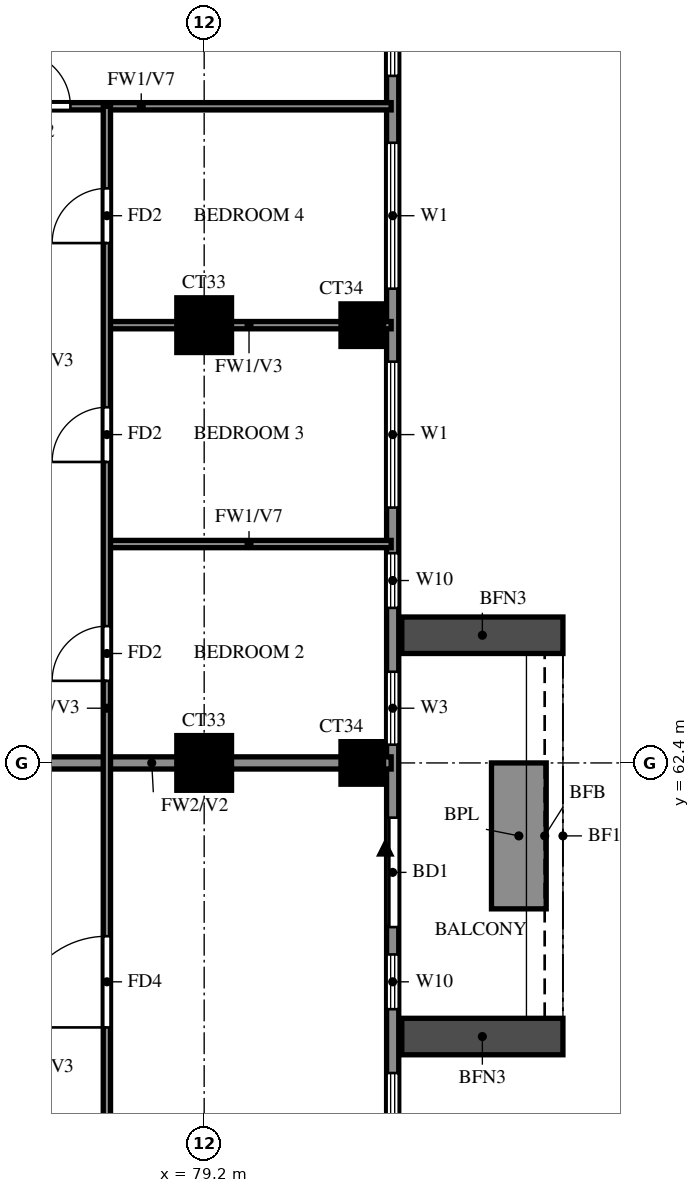
"""IFC4 building model, lengths in metres.
Left out: names, types, materials, properties, quantities, classifications, styles, units other than length and angle.
Written with IfcOpenShell. Run it as: python <this file> out.ifc"""

import sys

from ifc_helpers import new_model, si_unit, direction, frame, frame_2d, origin, origin_2d, place, context, subcontext, project, spatial, rectangle, extrude, source, transform, mapped, element, fill, save


model = new_model("IFC4")
c1 = context("Model", 3, precision=1e-05, world=origin(), true_north=direction((0.0, 1.0)))
c2 = subcontext(c1, "Body", "Model", "MODEL_VIEW")
j1 = project(units=[si_unit("LENGTHUNIT", "METRE"), si_unit("PLANEANGLEUNIT", "RADIAN")], contexts=[c1])
p1 = place(None, origin())
s1 = spatial("IfcSite", under=j1, at=p1, CompositionType="ELEMENT")
p2 = place(p1, origin())
s2 = spatial("IfcBuilding", under=s1, at=p2, CompositionType="ELEMENT")
p3 = place(p2, frame((0.0, 0.0, 222.0)))
s3 = spatial("IfcBuildingStorey", under=s2, at=p3, CompositionType="ELEMENT", Elevation=222.0)
m1 = source(origin(), c2, "Body", "SweptSolid", [
    extrude(rectangle(XDim=0.9, YDim=0.9, at=origin_2d()), origin(), (0.0, 0.0, 1.0), 3.22),
])
p4 = place(p3, frame((79.2, 62.4, 0.0), z_axis=(0.0, 0.0, 1.0), x_axis=(1.0, 0.0, 0.0)))
e1 = element("IfcColumn", 1, at=p4, inside=s3, PredefinedType="COLUMN", context=c2, shape_type="MappedRepresentation", body=[
    mapped(m1, transform((0.0, 0.0, 0.0))),
])
m2 = source(origin(), c2, "Body", "SweptSolid", [
    extrude(rectangle(XDim=0.7, YDim=0.7, at=origin_2d()), origin(), (0.0, 0.0, 1.0), 3.22),
])
p5 = place(p3, frame((81.8, 62.4, 0.0), z_axis=(0.0, 0.0, 1.0), x_axis=(1.0, 0.0, 0.0)))
e2 = element("IfcColumn", 2, at=p5, inside=s3, PredefinedType="COLUMN", context=c2, shape_type="MappedRepresentation", body=[
    mapped(m2, transform((0.0, 0.0, 0.0))),
])
p6 = place(p3, frame((79.2, 69.6, 0.0), z_axis=(0.0, 0.0, 1.0), x_axis=(1.0, 0.0, 0.0)))
e3 = element("IfcColumn", 3, at=p6, inside=s3, PredefinedType="COLUMN", context=c2, shape_type="MappedRepresentation", body=[
    mapped(m1, transform((0.0, 0.0, 0.0))),
])
p7 = place(p3, frame((81.8, 69.6, 0.0), z_axis=(0.0, 0.0, 1.0), x_axis=(1.0, 0.0, 0.0)))
e4 = element("IfcColumn", 4, at=p7, inside=s3, PredefinedType="COLUMN", context=c2, shape_type="MappedRepresentation", body=[
    mapped(m2, transform((0.0, 0.0, 0.0))),
])
p8 = place(p3, frame((82.3, 48.2, 0.0), z_axis=(0.0, 0.0, 1.0), x_axis=(0.0, 1.0, 0.0)))
e5 = element("IfcWall", 5, at=p8, inside=s3, PredefinedType="SOLIDWALL", context=c2, shape_type="SweptSolid", body=[
    extrude(rectangle(XDim=28.6, YDim=0.2, at=frame_2d((14.3, 0.0))), origin(), (0.0, 0.0, 1.0), 3.22),
])
p9 = place(p8, frame((11.5, 0.0, 0.0)))
e6 = element("IfcOpeningElement", 6, at=p9, cuts=e5, PredefinedType="OPENING", context=c2, shape_type="SweptSolid", body=[
    extrude(rectangle(XDim=1.8, YDim=2.4, at=frame_2d((0.9, 1.2))), frame((0.0, 0.11, 0.0), z_axis=(0.0, -1.0, 0.0), x_axis=(1.0, 0.0, 0.0)), (0.0, 0.0, 1.0), 0.22),
])
p10 = place(p8, frame((0.6, 0.0, 0.6)))
e7 = element("IfcOpeningElement", 7, at=p10, cuts=e5, PredefinedType="OPENING", context=c2, shape_type="SweptSolid", body=[
    extrude(rectangle(XDim=2.4, YDim=2.4, at=frame_2d((1.2, 1.2))), frame((0.0, 0.11, 0.0), z_axis=(0.0, -1.0, 0.0), x_axis=(1.0, 0.0, 0.0)), (0.0, 0.0, 1.0), 0.22),
])
p11 = place(p8, frame((4.75, 0.0, 1.5)))
e8 = element("IfcOpeningElement", 8, at=p11, cuts=e5, PredefinedType="OPENING", context=c2, shape_type="SweptSolid", body=[
    extrude(rectangle(XDim=0.9, YDim=0.9, at=frame_2d((0.45, 0.45))), frame((0.0, 0.11, 0.0), z_axis=(0.0, -1.0, 0.0), x_axis=(1.0, 0.0, 0.0)), (0.0, 0.0, 1.0), 0.22),
])
p12 = place(p8, frame((7.3, 0.0, 0.6)))
e9 = element("IfcOpeningElement", 9, at=p12, cuts=e5, PredefinedType="OPENING", context=c2, shape_type="SweptSolid", body=[
    extrude(rectangle(XDim=1.8, YDim=2.4, at=frame_2d((0.9, 1.2))), frame((0.0, 0.11, 0.0), z_axis=(0.0, -1.0, 0.0), x_axis=(1.0, 0.0, 0.0)), (0.0, 0.0, 1.0), 0.22),
])
p13 = place(p8, frame((10.15, 0.0, 0.6)))
e10 = element("IfcOpeningElement", 10, at=p13, cuts=e5, PredefinedType="OPENING", context=c2, shape_type="SweptSolid", body=[
    extrude(rectangle(XDim=0.9, YDim=2.4, at=frame_2d((0.45, 1.2))), frame((0.0, 0.11, 0.0), z_axis=(0.0, -1.0, 0.0), x_axis=(1.0, 0.0, 0.0)), (0.0, 0.0, 1.0), 0.22),
])
p14 = place(p8, frame((14.5, 0.0, 0.6)))
e11 = element("IfcOpeningElement", 11, at=p14, cuts=e5, PredefinedType="OPENING", context=c2, shape_type="SweptSolid", body=[
    extrude(rectangle(XDim=1.2, YDim=2.4, at=frame_2d((0.6, 1.2))), frame((0.0, 0.11, 0.0), z_axis=(0.0, -1.0, 0.0), x_axis=(1.0, 0.0, 0.0)), (0.0, 0.0, 1.0), 0.22),
])
p15 = place(p8, frame((16.75, 0.0, 0.6)))
e12 = element("IfcOpeningElement", 12, at=p15, cuts=e5, PredefinedType="OPENING", context=c2, shape_type="SweptSolid", body=[
    extrude(rectangle(XDim=0.9, YDim=2.4, at=frame_2d((0.45, 1.2))), frame((0.0, 0.11, 0.0), z_axis=(0.0, -1.0, 0.0), x_axis=(1.0, 0.0, 0.0)), (0.0, 0.0, 1.0), 0.22),
])
p16 = place(p8, frame((18.4, 0.0, 0.6)))
e13 = element("IfcOpeningElement", 13, at=p16, cuts=e5, PredefinedType="OPENING", context=c2, shape_type="SweptSolid", body=[
    extrude(rectangle(XDim=2.4, YDim=2.4, at=frame_2d((1.2, 1.2))), frame((0.0, 0.11, 0.0), z_axis=(0.0, -1.0, 0.0), x_axis=(1.0, 0.0, 0.0)), (0.0, 0.0, 1.0), 0.22),
])
p17 = place(p8, frame((22.0, 0.0, 0.6)))
e14 = element("IfcOpeningElement", 14, at=p17, cuts=e5, PredefinedType="OPENING", context=c2, shape_type="SweptSolid", body=[
    extrude(rectangle(XDim=2.4, YDim=2.4, at=frame_2d((1.2, 1.2))), frame((0.0, 0.11, 0.0), z_axis=(0.0, -1.0, 0.0), x_axis=(1.0, 0.0, 0.0)), (0.0, 0.0, 1.0), 0.22),
])
p18 = place(p8, frame((25.5, 0.0, 0.6)))
e15 = element("IfcOpeningElement", 15, at=p18, cuts=e5, PredefinedType="OPENING", context=c2, shape_type="SweptSolid", body=[
    extrude(rectangle(XDim=2.4, YDim=2.4, at=frame_2d((1.2, 1.2))), frame((0.0, 0.11, 0.0), z_axis=(0.0, -1.0, 0.0), x_axis=(1.0, 0.0, 0.0)), (0.0, 0.0, 1.0), 0.22),
])
for number, where, z_axis, x_axis in (
    (16, (82.45, 57.9, 0.0), (0.0, 0.0, 1.0), (1.0, 0.0, 0.0)),
    (17, (82.45, 64.5, 0.0), (0.0, 0.0, 1.0), (1.0, 0.0, 0.0)),
):
    element("IfcWall", number, at=place(p3, frame(where, z_axis=z_axis, x_axis=x_axis)), inside=s3, PredefinedType="SOLIDWALL", context=c2, shape_type="SweptSolid", body=[
        extrude(rectangle(XDim=2.65, YDim=0.6, at=frame_2d((1.325, 0.0))), origin(), (0.0, 0.0, 1.0), 2.85),
    ])
p19 = place(p3, frame((84.375, 60.0, 0.0), z_axis=(0.0, 0.0, 1.0), x_axis=(0.0, 1.0, 0.0)))
e18 = element("IfcWall", 18, at=p19, inside=s3, PredefinedType="SOLIDWALL", context=c2, shape_type="SweptSolid", body=[
    extrude(rectangle(XDim=2.4, YDim=0.9, at=frame_2d((1.2, 0.0))), origin(), (0.0, 0.0, 1.0), 0.9),
])
p20 = place(p3, frame((74.4, 62.4, 0.0), z_axis=(0.0, 0.0, 1.0), x_axis=(1.0, 0.0, 0.0)))
e19 = element("IfcWall", 19, at=p20, inside=s3, PredefinedType="SOLIDWALL", context=c2, shape_type="SweptSolid", body=[
    extrude(rectangle(XDim=7.875, YDim=0.2, at=frame_2d((3.938, 0.0))), origin(), (0.0, 0.0, 1.0), 3.22),
])
p21 = place(p3, frame((77.6, 66.0, 0.0), z_axis=(0.0, 0.0, 1.0), x_axis=(1.0, 0.0, 0.0)))
e20 = element("IfcWall", 20, at=p21, inside=s3, PredefinedType="PARTITIONING", context=c2, shape_type="SweptSolid", body=[
    extrude(rectangle(XDim=4.675, YDim=0.12, at=frame_2d((2.337, 0.0))), origin(), (0.0, 0.0, 1.0), 2.32),
])
p22 = place(p3, frame((77.6, 69.6, 0.0), z_axis=(0.0, 0.0, 1.0), x_axis=(1.0, 0.0, 0.0)))
e21 = element("IfcWall", 21, at=p22, inside=s3, PredefinedType="PARTITIONING", context=c2, shape_type="SweptSolid", body=[
    extrude(rectangle(XDim=4.675, YDim=0.12, at=frame_2d((2.337, 0.0))), origin(), (0.0, 0.0, 1.0), 3.22),
])
p23 = place(p3, frame((72.0, 73.2, 0.0), z_axis=(0.0, 0.0, 1.0), x_axis=(1.0, 0.0, 0.0)))
e22 = element("IfcWall", 22, at=p23, inside=s3, PredefinedType="PARTITIONING", context=c2, shape_type="SweptSolid", body=[
    extrude(rectangle(XDim=10.275, YDim=0.12, at=frame_2d((5.137, 0.0))), origin(), (0.0, 0.0, 1.0), 2.32),
])
p24 = place(p23, frame((4.1, 0.0, 0.0)))
e23 = element("IfcOpeningElement", 23, at=p24, cuts=e22, PredefinedType="OPENING", context=c2, shape_type="SweptSolid", body=[
    extrude(rectangle(XDim=0.9, YDim=2.1, at=frame_2d((0.45, 1.05))), frame((0.0, 0.07, 0.0), z_axis=(0.0, -1.0, 0.0), x_axis=(1.0, 0.0, 0.0)), (0.0, 0.0, 1.0), 0.14),
])
p25 = place(p3, frame((77.6, 55.2, 0.0), z_axis=(0.0, 0.0, 1.0), x_axis=(0.0, 1.0, 0.0)))
e24 = element("IfcWall", 24, at=p25, inside=s3, PredefinedType="PARTITIONING", context=c2, shape_type="SweptSolid", body=[
    extrude(rectangle(XDim=18.0, YDim=0.12, at=frame_2d((9.0, 0.0))), origin(), (0.0, 0.0, 1.0), 3.22),
])
p26 = place(p25, frame((2.85, 0.0, 0.0)))
e25 = element("IfcOpeningElement", 25, at=p26, cuts=e24, PredefinedType="OPENING", context=c2, shape_type="SweptSolid", body=[
    extrude(rectangle(XDim=1.5, YDim=2.1, at=frame_2d((0.75, 1.05))), frame((0.0, 0.07, 0.0), z_axis=(0.0, -1.0, 0.0), x_axis=(1.0, 0.0, 0.0)), (0.0, 0.0, 1.0), 0.14),
])
p27 = place(p25, frame((8.55, 0.0, 0.0)))
e26 = element("IfcOpeningElement", 26, at=p27, cuts=e24, PredefinedType="OPENING", context=c2, shape_type="SweptSolid", body=[
    extrude(rectangle(XDim=0.9, YDim=2.1, at=frame_2d((0.45, 1.05))), frame((0.0, 0.07, 0.0), z_axis=(0.0, -1.0, 0.0), x_axis=(1.0, 0.0, 0.0)), (0.0, 0.0, 1.0), 0.14),
])
p28 = place(p25, frame((12.15, 0.0, 0.0)))
e27 = element("IfcOpeningElement", 27, at=p28, cuts=e24, PredefinedType="OPENING", context=c2, shape_type="SweptSolid", body=[
    extrude(rectangle(XDim=0.9, YDim=2.1, at=frame_2d((0.45, 1.05))), frame((0.0, 0.07, 0.0), z_axis=(0.0, -1.0, 0.0), x_axis=(1.0, 0.0, 0.0)), (0.0, 0.0, 1.0), 0.14),
])
p29 = place(p25, frame((15.75, 0.0, 0.0)))
e28 = element("IfcOpeningElement", 28, at=p29, cuts=e24, PredefinedType="OPENING", context=c2, shape_type="SweptSolid", body=[
    extrude(rectangle(XDim=0.9, YDim=2.1, at=frame_2d((0.45, 1.05))), frame((0.0, 0.07, 0.0), z_axis=(0.0, -1.0, 0.0), x_axis=(1.0, 0.0, 0.0)), (0.0, 0.0, 1.0), 0.14),
])
p30 = place(p9, origin())
e29 = element("IfcDoor", 29, at=p30, inside=s3, OperationType="DOUBLE_DOOR_SLIDING", PredefinedType="DOOR", context=c2, shape_type="SweptSolid", body=[
    extrude(rectangle(XDim=1.8, YDim=2.4, at=frame_2d((0.9, 1.2))), frame((0.0, 0.025, 0.0), z_axis=(0.0, -1.0, 0.0), x_axis=(1.0, 0.0, 0.0)), (0.0, 0.0, 1.0), 0.05),
])
fill(e6, e29)
p31 = place(p12, origin())
e30 = element("IfcWindow", 30, at=p31, inside=s3, PartitioningType="DOUBLE_PANEL_VERTICAL", PredefinedType="WINDOW", context=c2, shape_type="SweptSolid", body=[
    extrude(rectangle(XDim=1.8, YDim=2.4, at=frame_2d((0.9, 1.2))), frame((0.0, 0.03, 0.0), z_axis=(0.0, -1.0, 0.0), x_axis=(1.0, 0.0, 0.0)), (0.0, 0.0, 1.0), 0.06),
])
fill(e9, e30)
p32 = place(p13, origin())
e31 = element("IfcWindow", 31, at=p32, inside=s3, PartitioningType="SINGLE_PANEL", PredefinedType="WINDOW", context=c2, shape_type="SweptSolid", body=[
    extrude(rectangle(XDim=0.9, YDim=2.4, at=frame_2d((0.45, 1.2))), frame((0.0, 0.03, 0.0), z_axis=(0.0, -1.0, 0.0), x_axis=(1.0, 0.0, 0.0)), (0.0, 0.0, 1.0), 0.06),
])
fill(e10, e31)
p33 = place(p14, origin())
e32 = element("IfcWindow", 32, at=p33, inside=s3, PartitioningType="SINGLE_PANEL", PredefinedType="WINDOW", context=c2, shape_type="SweptSolid", body=[
    extrude(rectangle(XDim=1.2, YDim=2.4, at=frame_2d((0.6, 1.2))), frame((0.0, 0.03, 0.0), z_axis=(0.0, -1.0, 0.0), x_axis=(1.0, 0.0, 0.0)), (0.0, 0.0, 1.0), 0.06),
])
fill(e11, e32)
p34 = place(p15, origin())
e33 = element("IfcWindow", 33, at=p34, inside=s3, PartitioningType="SINGLE_PANEL", PredefinedType="WINDOW", context=c2, shape_type="SweptSolid", body=[
    extrude(rectangle(XDim=0.9, YDim=2.4, at=frame_2d((0.45, 1.2))), frame((0.0, 0.03, 0.0), z_axis=(0.0, -1.0, 0.0), x_axis=(1.0, 0.0, 0.0)), (0.0, 0.0, 1.0), 0.06),
])
fill(e12, e33)
p35 = place(p16, origin())
e34 = element("IfcWindow", 34, at=p35, inside=s3, PartitioningType="DOUBLE_PANEL_VERTICAL", PredefinedType="WINDOW", context=c2, shape_type="SweptSolid", body=[
    extrude(rectangle(XDim=2.4, YDim=2.4, at=frame_2d((1.2, 1.2))), frame((0.0, 0.03, 0.0), z_axis=(0.0, -1.0, 0.0), x_axis=(1.0, 0.0, 0.0)), (0.0, 0.0, 1.0), 0.06),
])
fill(e13, e34)
p36 = place(p17, origin())
e35 = element("IfcWindow", 35, at=p36, inside=s3, PartitioningType="DOUBLE_PANEL_VERTICAL", PredefinedType="WINDOW", context=c2, shape_type="SweptSolid", body=[
    extrude(rectangle(XDim=2.4, YDim=2.4, at=frame_2d((1.2, 1.2))), frame((0.0, 0.03, 0.0), z_axis=(0.0, -1.0, 0.0), x_axis=(1.0, 0.0, 0.0)), (0.0, 0.0, 1.0), 0.06),
])
fill(e14, e35)
p37 = place(p18, origin())
e36 = element("IfcWindow", 36, at=p37, inside=s3, PartitioningType="DOUBLE_PANEL_VERTICAL", PredefinedType="WINDOW", context=c2, shape_type="SweptSolid", body=[
    extrude(rectangle(XDim=2.4, YDim=2.4, at=frame_2d((1.2, 1.2))), frame((0.0, 0.03, 0.0), z_axis=(0.0, -1.0, 0.0), x_axis=(1.0, 0.0, 0.0)), (0.0, 0.0, 1.0), 0.06),
])
fill(e15, e36)
p38 = place(p26, origin())
e37 = element("IfcDoor", 37, at=p38, inside=s3, OperationType="SINGLE_SWING_LEFT", PredefinedType="DOOR", context=c2, shape_type="SweptSolid", body=[
    extrude(rectangle(XDim=1.5, YDim=2.1, at=frame_2d((0.75, 1.05))), frame((0.0, 0.025, 0.0), z_axis=(0.0, -1.0, 0.0), x_axis=(1.0, 0.0, 0.0)), (0.0, 0.0, 1.0), 0.05),
])
fill(e25, e37)
p39 = place(p27, origin())
e38 = element("IfcDoor", 38, at=p39, inside=s3, OperationType="SINGLE_SWING_LEFT", PredefinedType="DOOR", context=c2, shape_type="SweptSolid", body=[
    extrude(rectangle(XDim=0.9, YDim=2.1, at=frame_2d((0.45, 1.05))), frame((0.0, 0.025, 0.0), z_axis=(0.0, -1.0, 0.0), x_axis=(1.0, 0.0, 0.0)), (0.0, 0.0, 1.0), 0.05),
])
fill(e26, e38)
p40 = place(p28, origin())
e39 = element("IfcDoor", 39, at=p40, inside=s3, OperationType="SINGLE_SWING_RIGHT", PredefinedType="DOOR", context=c2, shape_type="SweptSolid", body=[
    extrude(rectangle(XDim=0.9, YDim=2.1, at=frame_2d((0.45, 1.05))), frame((0.0, 0.025, 0.0), z_axis=(0.0, -1.0, 0.0), x_axis=(1.0, 0.0, 0.0)), (0.0, 0.0, 1.0), 0.05),
])
fill(e27, e39)
p41 = place(p29, origin())
e40 = element("IfcDoor", 40, at=p41, inside=s3, OperationType="SINGLE_SWING_LEFT", PredefinedType="DOOR", context=c2, shape_type="SweptSolid", body=[
    extrude(rectangle(XDim=0.9, YDim=2.1, at=frame_2d((0.45, 1.05))), frame((0.0, 0.025, 0.0), z_axis=(0.0, -1.0, 0.0), x_axis=(1.0, 0.0, 0.0)), (0.0, 0.0, 1.0), 0.05),
])
fill(e28, e40)
p42 = place(p24, origin())
e41 = element("IfcDoor", 41, at=p42, inside=s3, OperationType="SINGLE_SWING_LEFT", PredefinedType="DOOR", context=c2, shape_type="SweptSolid", body=[
    extrude(rectangle(XDim=0.9, YDim=2.1, at=frame_2d((0.45, 1.05))), frame((0.0, 0.025, 0.0), z_axis=(0.0, -1.0, 0.0), x_axis=(1.0, 0.0, 0.0)), (0.0, 0.0, 1.0), 0.05),
])
fill(e23, e41)
save(model, sys.argv[1])
